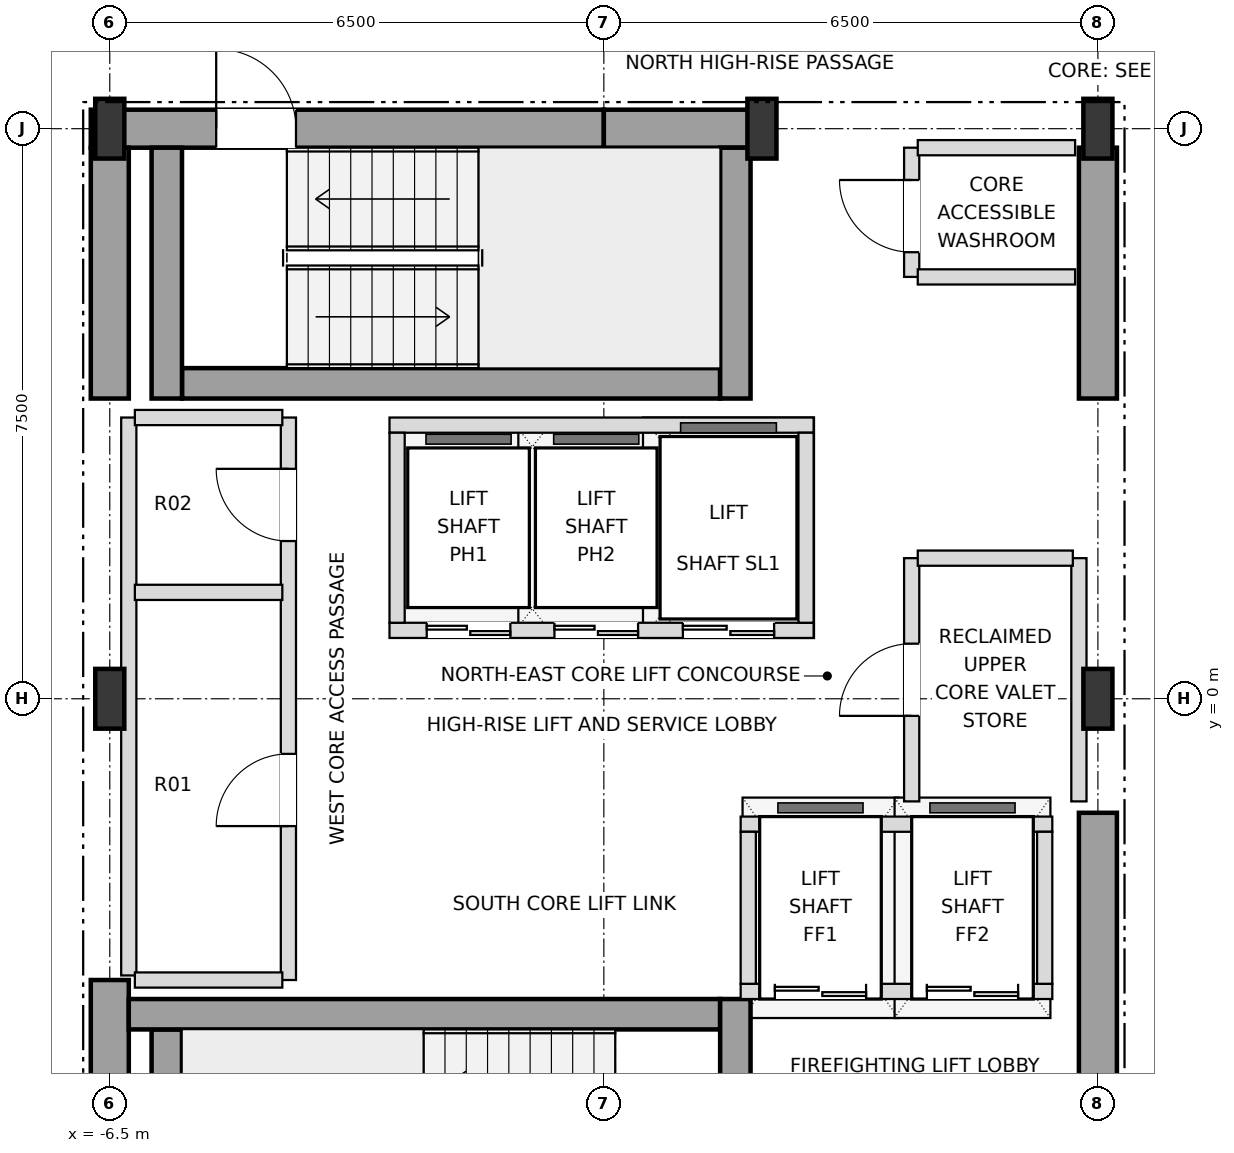
"""IFC4 building model, lengths in metres.
Left out: names, types, materials, properties, quantities, classifications, styles, units other than length and angle.
Written with IfcOpenShell. Run it as: python <this file> out.ifc"""

import sys

from ifc_helpers import new_model, si_unit, direction, frame, frame_2d, origin, origin_2d, place, context, subcontext, project, spatial, rectangle, i_section, extrude, element, fill, save


model = new_model("IFC4")
c1 = context("Model", 3, precision=1e-05, world=origin(), true_north=direction((0.0, 1.0)))
c2 = subcontext(c1, "Body", "Model", "MODEL_VIEW")
j1 = project(units=[si_unit("LENGTHUNIT", "METRE"), si_unit("PLANEANGLEUNIT", "RADIAN")], contexts=[c1])
p1 = place(None, origin())
s1 = spatial("IfcSite", under=j1, at=p1, CompositionType="ELEMENT")
p2 = place(p1, origin())
s2 = spatial("IfcBuilding", under=s1, at=p2, CompositionType="ELEMENT")
p3 = place(p2, frame((0.0, 0.0, 240.3)))
s3 = spatial("IfcBuildingStorey", under=s2, at=p3, CompositionType="ELEMENT", Elevation=240.3)
for number, where, z_axis, x_axis in (
    (1, (-6.5, 0.0, 0.0), (0.0, 0.0, 1.0), (1.0, 0.0, 0.0)),
    (2, (6.5, 0.0, 0.0), (0.0, 0.0, 1.0), (1.0, 0.0, 0.0)),
    (3, (-6.5, 7.5, 0.0), (0.0, 0.0, 1.0), (1.0, 0.0, 0.0)),
    (4, (2.08, 7.5, 0.0), (0.0, 0.0, 1.0), (1.0, 0.0, 0.0)),
    (5, (6.5, 7.5, 0.0), (0.0, 0.0, 1.0), (1.0, 0.0, 0.0)),
):
    element("IfcColumn", number, at=place(p3, frame(where, z_axis=z_axis, x_axis=x_axis)), inside=s3, PredefinedType="COLUMN", context=c2, shape_type="SweptSolid", body=[
        extrude(i_section(OverallWidth=0.382, OverallDepth=0.786, WebThickness=0.02, FlangeThickness=0.033, at=origin_2d()), origin(), (0.0, 0.0, 1.0), 3.6),
    ])
p4 = place(p3, frame((-6.75, 7.5, 0.0), z_axis=(0.0, 0.0, 1.0), x_axis=(1.0, 0.0, 0.0)))
e6 = element("IfcWall", 6, at=p4, inside=s3, PredefinedType="SHEAR", context=c2, shape_type="SweptSolid", body=[
    extrude(rectangle(XDim=6.75, YDim=0.5, at=frame_2d((3.375, 0.0))), origin(), (0.0, 0.0, 1.0), 3.38),
])
p5 = place(p4, frame((1.65, 0.0, 0.0)))
e7 = element("IfcOpeningElement", 7, at=p5, cuts=e6, PredefinedType="OPENING", context=c2, shape_type="SweptSolid", body=[
    extrude(rectangle(XDim=1.05, YDim=2.15, at=frame_2d((0.525, 1.075))), frame((0.0, 0.26, 0.0), z_axis=(0.0, -1.0, 0.0), x_axis=(1.0, 0.0, 0.0)), (0.0, 0.0, 1.0), 0.52),
])
p6 = place(p3, frame((0.0, 7.5, 0.0), z_axis=(0.0, 0.0, 1.0), x_axis=(1.0, 0.0, 0.0)))
e8 = element("IfcWall", 8, at=p6, inside=s3, PredefinedType="SHEAR", context=c2, shape_type="SweptSolid", body=[
    extrude(rectangle(XDim=2.08, YDim=0.5, at=frame_2d((1.04, 0.0))), origin(), (0.0, 0.0, 1.0), 3.38),
])
p7 = place(p3, frame((-6.5, -7.25, 0.0), z_axis=(0.0, 0.0, 1.0), x_axis=(0.0, 1.0, 0.0)))
e9 = element("IfcWall", 9, at=p7, inside=s3, PredefinedType="SHEAR", context=c2, shape_type="SweptSolid", body=[
    extrude(rectangle(XDim=3.55, YDim=0.5, at=frame_2d((1.775, 0.0))), origin(), (0.0, 0.0, 1.0), 3.38),
])
p8 = place(p3, frame((-6.5, 3.95, 0.0), z_axis=(0.0, 0.0, 1.0), x_axis=(0.0, 1.0, 0.0)))
e10 = element("IfcWall", 10, at=p8, inside=s3, PredefinedType="SHEAR", context=c2, shape_type="SweptSolid", body=[
    extrude(rectangle(XDim=3.3, YDim=0.5, at=frame_2d((1.65, 0.0))), origin(), (0.0, 0.0, 1.0), 3.38),
])
p9 = place(p3, frame((6.5, -7.25, 0.0), z_axis=(0.0, 0.0, 1.0), x_axis=(0.0, 1.0, 0.0)))
e11 = element("IfcWall", 11, at=p9, inside=s3, PredefinedType="SHEAR", context=c2, shape_type="SweptSolid", body=[
    extrude(rectangle(XDim=5.75, YDim=0.5, at=frame_2d((2.875, 0.0))), origin(), (0.0, 0.0, 1.0), 3.38),
])
p10 = place(p9, frame((0.85, 0.0, 0.0)))
e12 = element("IfcOpeningElement", 12, at=p10, cuts=e11, PredefinedType="OPENING", context=c2, shape_type="SweptSolid", body=[
    extrude(rectangle(XDim=1.05, YDim=2.15, at=frame_2d((0.525, 1.075))), frame((0.0, 0.26, 0.0), z_axis=(0.0, -1.0, 0.0), x_axis=(1.0, 0.0, 0.0)), (0.0, 0.0, 1.0), 0.52),
])
p11 = place(p3, frame((6.5, 3.95, 0.0), z_axis=(0.0, 0.0, 1.0), x_axis=(0.0, 1.0, 0.0)))
e13 = element("IfcWall", 13, at=p11, inside=s3, PredefinedType="SHEAR", context=c2, shape_type="SweptSolid", body=[
    extrude(rectangle(XDim=3.3, YDim=0.5, at=frame_2d((1.65, 0.0))), origin(), (0.0, 0.0, 1.0), 3.38),
])
p12 = place(p3, frame((-5.75, -7.25, 0.0), z_axis=(0.0, 0.0, 1.0), x_axis=(0.0, 1.0, 0.0)))
e14 = element("IfcWall", 14, at=p12, inside=s3, PredefinedType="SHEAR", context=c2, shape_type="SweptSolid", body=[
    extrude(rectangle(XDim=2.9, YDim=0.4, at=frame_2d((1.45, 0.0))), origin(), (0.0, 0.0, 1.0), 3.38),
])
p13 = place(p3, frame((-6.25, -4.15, 0.0), z_axis=(0.0, 0.0, 1.0), x_axis=(1.0, 0.0, 0.0)))
e15 = element("IfcWall", 15, at=p13, inside=s3, PredefinedType="SHEAR", context=c2, shape_type="SweptSolid", body=[
    extrude(rectangle(XDim=7.78, YDim=0.4, at=frame_2d((3.89, 0.0))), origin(), (0.0, 0.0, 1.0), 3.38),
])
p14 = place(p3, frame((1.73, -7.25, 0.0), z_axis=(0.0, 0.0, 1.0), x_axis=(0.0, 1.0, 0.0)))
e16 = element("IfcWall", 16, at=p14, inside=s3, PredefinedType="SHEAR", context=c2, shape_type="SweptSolid", body=[
    extrude(rectangle(XDim=3.3, YDim=0.4, at=frame_2d((1.65, 0.0))), origin(), (0.0, 0.0, 1.0), 3.38),
])
p15 = place(p14, frame((0.9, 0.0, 0.0)))
e17 = element("IfcOpeningElement", 17, at=p15, cuts=e16, PredefinedType="OPENING", context=c2, shape_type="SweptSolid", body=[
    extrude(rectangle(XDim=1.05, YDim=2.15, at=frame_2d((0.525, 1.075))), frame((0.0, 0.21, 0.0), z_axis=(0.0, -1.0, 0.0), x_axis=(1.0, 0.0, 0.0)), (0.0, 0.0, 1.0), 0.42),
])
p16 = place(p3, frame((-5.55, 4.15, 0.0), z_axis=(0.0, 0.0, 1.0), x_axis=(1.0, 0.0, 0.0)))
e18 = element("IfcWall", 18, at=p16, inside=s3, PredefinedType="SHEAR", context=c2, shape_type="SweptSolid", body=[
    extrude(rectangle(XDim=7.08, YDim=0.4, at=frame_2d((3.54, 0.0))), origin(), (0.0, 0.0, 1.0), 3.38),
])
for number, where, z_axis, x_axis in (
    (19, (1.73, 3.95, 0.0), (0.0, 0.0, 1.0), (0.0, 1.0, 0.0)),
    (20, (-5.75, 3.95, 0.0), (0.0, 0.0, 1.0), (0.0, 1.0, 0.0)),
):
    element("IfcWall", number, at=place(p3, frame(where, z_axis=z_axis, x_axis=x_axis)), inside=s3, PredefinedType="SHEAR", context=c2, shape_type="SweptSolid", body=[
        extrude(rectangle(XDim=3.3, YDim=0.4, at=frame_2d((1.65, 0.0))), origin(), (0.0, 0.0, 1.0), 3.38),
    ])
p17 = place(p3, frame((-2.82, 0.9, 0.0), z_axis=(0.0, 0.0, 1.0), x_axis=(1.0, 0.0, 0.0)))
e21 = element("IfcWall", 21, at=p17, inside=s3, PredefinedType="SOLIDWALL", context=c2, shape_type="SweptSolid", body=[
    extrude(rectangle(XDim=5.58, YDim=0.2, at=frame_2d((2.79, 0.0))), origin(), (0.0, 0.0, 1.0), 3.38),
])
p18 = place(p17, frame((0.49, 0.0, 0.0)))
e22 = element("IfcOpeningElement", 22, at=p18, cuts=e21, PredefinedType="OPENING", context=c2, shape_type="SweptSolid", body=[
    extrude(rectangle(XDim=1.1, YDim=2.15, at=frame_2d((0.55, 1.075))), frame((0.0, 0.11, 0.0), z_axis=(0.0, -1.0, 0.0), x_axis=(1.0, 0.0, 0.0)), (0.0, 0.0, 1.0), 0.22),
])
p19 = place(p17, frame((2.17, 0.0, 0.0)))
e23 = element("IfcOpeningElement", 23, at=p19, cuts=e21, PredefinedType="OPENING", context=c2, shape_type="SweptSolid", body=[
    extrude(rectangle(XDim=1.1, YDim=2.15, at=frame_2d((0.55, 1.075))), frame((0.0, 0.11, 0.0), z_axis=(0.0, -1.0, 0.0), x_axis=(1.0, 0.0, 0.0)), (0.0, 0.0, 1.0), 0.22),
])
p20 = place(p17, frame((3.86, 0.0, 0.0)))
e24 = element("IfcOpeningElement", 24, at=p20, cuts=e21, PredefinedType="OPENING", context=c2, shape_type="SweptSolid", body=[
    extrude(rectangle(XDim=1.2, YDim=2.2, at=frame_2d((0.6, 1.1))), frame((0.0, 0.11, 0.0), z_axis=(0.0, -1.0, 0.0), x_axis=(1.0, 0.0, 0.0)), (0.0, 0.0, 1.0), 0.22),
])
p21 = place(p3, frame((-2.82, 3.6, 0.0), z_axis=(0.0, 0.0, 1.0), x_axis=(1.0, 0.0, 0.0)))
e25 = element("IfcWall", 25, at=p21, inside=s3, PredefinedType="SOLIDWALL", context=c2, shape_type="SweptSolid", body=[
    extrude(rectangle(XDim=5.58, YDim=0.2, at=frame_2d((2.79, 0.0))), origin(), (0.0, 0.0, 1.0), 3.38),
])
for number, where, z_axis, x_axis in (
    (26, (-2.72, 1.0, 0.0), (0.0, 0.0, 1.0), (0.0, 1.0, 0.0)),
    (27, (2.66, 1.0, 0.0), (0.0, 0.0, 1.0), (0.0, 1.0, 0.0)),
):
    element("IfcWall", number, at=place(p3, frame(where, z_axis=z_axis, x_axis=x_axis)), inside=s3, PredefinedType="SOLIDWALL", context=c2, shape_type="SweptSolid", body=[
        extrude(rectangle(XDim=2.5, YDim=0.2, at=frame_2d((1.25, 0.0))), origin(), (0.0, 0.0, 1.0), 3.38),
    ])
p22 = place(p3, frame((1.8, -3.85, 0.0), z_axis=(0.0, 0.0, 1.0), x_axis=(1.0, 0.0, 0.0)))
e28 = element("IfcWall", 28, at=p22, inside=s3, PredefinedType="SOLIDWALL", context=c2, shape_type="SweptSolid", body=[
    extrude(rectangle(XDim=4.1, YDim=0.2, at=frame_2d((2.05, 0.0))), origin(), (0.0, 0.0, 1.0), 3.38),
])
p23 = place(p22, frame((0.45, 0.0, 0.0)))
e29 = element("IfcOpeningElement", 29, at=p23, cuts=e28, PredefinedType="OPENING", context=c2, shape_type="SweptSolid", body=[
    extrude(rectangle(XDim=1.2, YDim=2.2, at=frame_2d((0.6, 1.1))), frame((0.0, 0.11, 0.0), z_axis=(0.0, -1.0, 0.0), x_axis=(1.0, 0.0, 0.0)), (0.0, 0.0, 1.0), 0.22),
])
p24 = place(p22, frame((2.45, 0.0, 0.0)))
e30 = element("IfcOpeningElement", 30, at=p24, cuts=e28, PredefinedType="OPENING", context=c2, shape_type="SweptSolid", body=[
    extrude(rectangle(XDim=1.2, YDim=2.2, at=frame_2d((0.6, 1.1))), frame((0.0, 0.11, 0.0), z_axis=(0.0, -1.0, 0.0), x_axis=(1.0, 0.0, 0.0)), (0.0, 0.0, 1.0), 0.22),
])
p25 = place(p3, frame((1.8, -1.65, 0.0), z_axis=(0.0, 0.0, 1.0), x_axis=(1.0, 0.0, 0.0)))
e31 = element("IfcWall", 31, at=p25, inside=s3, PredefinedType="SOLIDWALL", context=c2, shape_type="SweptSolid", body=[
    extrude(rectangle(XDim=4.1, YDim=0.2, at=frame_2d((2.05, 0.0))), origin(), (0.0, 0.0, 1.0), 3.38),
])
for number, where, z_axis, x_axis in (
    (32, (1.9, -3.75, 0.0), (0.0, 0.0, 1.0), (0.0, 1.0, 0.0)),
    (33, (5.8, -3.75, 0.0), (0.0, 0.0, 1.0), (0.0, 1.0, 0.0)),
):
    element("IfcWall", number, at=place(p3, frame(where, z_axis=z_axis, x_axis=x_axis)), inside=s3, PredefinedType="SOLIDWALL", context=c2, shape_type="SweptSolid", body=[
        extrude(rectangle(XDim=2.0, YDim=0.2, at=frame_2d((1.0, 0.0))), origin(), (0.0, 0.0, 1.0), 3.38),
    ])
p26 = place(p3, frame((-6.25, -3.64, 0.0), z_axis=(0.0, 0.0, 1.0), x_axis=(0.0, 1.0, 0.0)))
e34 = element("IfcWall", 34, at=p26, inside=s3, PredefinedType="SOLIDWALL", context=c2, shape_type="SweptSolid", body=[
    extrude(rectangle(XDim=7.34, YDim=0.2, at=frame_2d((3.67, 0.0))), origin(), (0.0, 0.0, 1.0), 3.38),
])
p27 = place(p3, frame((-4.15, -3.7, 0.0), z_axis=(0.0, 0.0, 1.0), x_axis=(0.0, 1.0, 0.0)))
e35 = element("IfcWall", 35, at=p27, inside=s3, PredefinedType="SOLIDWALL", context=c2, shape_type="SweptSolid", body=[
    extrude(rectangle(XDim=7.4, YDim=0.2, at=frame_2d((3.7, 0.0))), origin(), (0.0, 0.0, 1.0), 3.38),
])
p28 = place(p27, frame((2.025, 0.0, 0.0)))
e36 = element("IfcOpeningElement", 36, at=p28, cuts=e35, PredefinedType="OPENING", context=c2, shape_type="SweptSolid", body=[
    extrude(rectangle(XDim=0.95, YDim=2.15, at=frame_2d((0.475, 1.075))), frame((0.0, 0.11, 0.0), z_axis=(0.0, -1.0, 0.0), x_axis=(1.0, 0.0, 0.0)), (0.0, 0.0, 1.0), 0.22),
])
p29 = place(p27, frame((5.775, 0.0, 0.0)))
e37 = element("IfcOpeningElement", 37, at=p29, cuts=e35, PredefinedType="OPENING", context=c2, shape_type="SweptSolid", body=[
    extrude(rectangle(XDim=0.95, YDim=2.15, at=frame_2d((0.475, 1.075))), frame((0.0, 0.11, 0.0), z_axis=(0.0, -1.0, 0.0), x_axis=(1.0, 0.0, 0.0)), (0.0, 0.0, 1.0), 0.22),
])
p30 = place(p3, frame((4.05, -1.35, 0.0), z_axis=(0.0, 0.0, 1.0), x_axis=(0.0, 1.0, 0.0)))
e38 = element("IfcWall", 38, at=p30, inside=s3, PredefinedType="SOLIDWALL", context=c2, shape_type="SweptSolid", body=[
    extrude(rectangle(XDim=3.2, YDim=0.2, at=frame_2d((1.6, 0.0))), origin(), (0.0, 0.0, 1.0), 3.38),
])
p31 = place(p30, frame((1.125, 0.0, 0.0)))
e39 = element("IfcOpeningElement", 39, at=p31, cuts=e38, PredefinedType="OPENING", context=c2, shape_type="SweptSolid", body=[
    extrude(rectangle(XDim=0.95, YDim=2.15, at=frame_2d((0.475, 1.075))), frame((0.0, 0.11, 0.0), z_axis=(0.0, -1.0, 0.0), x_axis=(1.0, 0.0, 0.0)), (0.0, 0.0, 1.0), 0.22),
])
p32 = place(p3, frame((4.05, 5.55, 0.0), z_axis=(0.0, 0.0, 1.0), x_axis=(0.0, 1.0, 0.0)))
e40 = element("IfcWall", 40, at=p32, inside=s3, PredefinedType="SOLIDWALL", context=c2, shape_type="SweptSolid", body=[
    extrude(rectangle(XDim=1.7, YDim=0.2, at=frame_2d((0.85, 0.0))), origin(), (0.0, 0.0, 1.0), 3.38),
])
p33 = place(p32, frame((0.325, 0.0, 0.0)))
e41 = element("IfcOpeningElement", 41, at=p33, cuts=e40, PredefinedType="OPENING", context=c2, shape_type="SweptSolid", body=[
    extrude(rectangle(XDim=0.95, YDim=2.15, at=frame_2d((0.475, 1.075))), frame((0.0, 0.11, 0.0), z_axis=(0.0, -1.0, 0.0), x_axis=(1.0, 0.0, 0.0)), (0.0, 0.0, 1.0), 0.22),
])
p34 = place(p3, frame((6.25, -1.35, 0.0), z_axis=(0.0, 0.0, 1.0), x_axis=(0.0, 1.0, 0.0)))
e42 = element("IfcWall", 42, at=p34, inside=s3, PredefinedType="SOLIDWALL", context=c2, shape_type="SweptSolid", body=[
    extrude(rectangle(XDim=3.2, YDim=0.2, at=frame_2d((1.6, 0.0))), origin(), (0.0, 0.0, 1.0), 3.38),
])
for number, where, z_axis, x_axis in (
    (43, (-6.17, -3.7, 0.0), (0.0, 0.0, 1.0), (1.0, 0.0, 0.0)),
    (44, (-6.17, 1.4, 0.0), (0.0, 0.0, 1.0), (1.0, 0.0, 0.0)),
):
    element("IfcWall", number, at=place(p3, frame(where, z_axis=z_axis, x_axis=x_axis)), inside=s3, PredefinedType="SOLIDWALL", context=c2, shape_type="SweptSolid", body=[
        extrude(rectangle(XDim=1.94, YDim=0.2, at=frame_2d((0.97, 0.0))), origin(), (0.0, 0.0, 1.0), 3.38),
    ])
p35 = place(p3, frame((4.13, 1.85, 0.0), z_axis=(0.0, 0.0, 1.0), x_axis=(1.0, 0.0, 0.0)))
e45 = element("IfcWall", 45, at=p35, inside=s3, PredefinedType="SOLIDWALL", context=c2, shape_type="SweptSolid", body=[
    extrude(rectangle(XDim=2.04, YDim=0.2, at=frame_2d((1.02, 0.0))), origin(), (0.0, 0.0, 1.0), 3.38),
])
p36 = place(p3, frame((-6.17, 3.7, 0.0), z_axis=(0.0, 0.0, 1.0), x_axis=(1.0, 0.0, 0.0)))
e46 = element("IfcWall", 46, at=p36, inside=s3, PredefinedType="SOLIDWALL", context=c2, shape_type="SweptSolid", body=[
    extrude(rectangle(XDim=1.94, YDim=0.2, at=frame_2d((0.97, 0.0))), origin(), (0.0, 0.0, 1.0), 3.38),
])
for number, where, z_axis, x_axis in (
    (47, (4.13, 5.55, 0.0), (0.0, 0.0, 1.0), (1.0, 0.0, 0.0)),
    (48, (4.13, 7.25, 0.0), (0.0, 0.0, 1.0), (1.0, 0.0, 0.0)),
):
    element("IfcWall", number, at=place(p3, frame(where, z_axis=z_axis, x_axis=x_axis)), inside=s3, PredefinedType="SOLIDWALL", context=c2, shape_type="SweptSolid", body=[
        extrude(rectangle(XDim=2.07, YDim=0.2, at=frame_2d((1.035, 0.0))), origin(), (0.0, 0.0, 1.0), 3.38),
    ])
p37 = place(p5, origin())
e49 = element("IfcDoor", 49, at=p37, inside=s3, OperationType="SINGLE_SWING_LEFT", PredefinedType="DOOR", context=c2, shape_type="SweptSolid", body=[
    extrude(rectangle(XDim=1.05, YDim=2.15, at=frame_2d((0.525, 1.075))), frame((0.0, 0.025, 0.0), z_axis=(0.0, -1.0, 0.0), x_axis=(1.0, 0.0, 0.0)), (0.0, 0.0, 1.0), 0.05),
])
fill(e7, e49)
p38 = place(p18, origin())
e50 = element("IfcDoor", 50, at=p38, inside=s3, OperationType="DOUBLE_DOOR_SLIDING", PredefinedType="DOOR", context=c2, shape_type="SweptSolid", body=[
    extrude(rectangle(XDim=1.1, YDim=2.15, at=frame_2d((0.55, 1.075))), frame((0.0, 0.025, 0.0), z_axis=(0.0, -1.0, 0.0), x_axis=(1.0, 0.0, 0.0)), (0.0, 0.0, 1.0), 0.05),
])
fill(e22, e50)
p39 = place(p19, origin())
e51 = element("IfcDoor", 51, at=p39, inside=s3, OperationType="DOUBLE_DOOR_SLIDING", PredefinedType="DOOR", context=c2, shape_type="SweptSolid", body=[
    extrude(rectangle(XDim=1.1, YDim=2.15, at=frame_2d((0.55, 1.075))), frame((0.0, 0.025, 0.0), z_axis=(0.0, -1.0, 0.0), x_axis=(1.0, 0.0, 0.0)), (0.0, 0.0, 1.0), 0.05),
])
fill(e23, e51)
p40 = place(p20, origin())
e52 = element("IfcDoor", 52, at=p40, inside=s3, OperationType="DOUBLE_DOOR_SLIDING", PredefinedType="DOOR", context=c2, shape_type="SweptSolid", body=[
    extrude(rectangle(XDim=1.2, YDim=2.2, at=frame_2d((0.6, 1.1))), frame((0.0, 0.025, 0.0), z_axis=(0.0, -1.0, 0.0), x_axis=(1.0, 0.0, 0.0)), (0.0, 0.0, 1.0), 0.05),
])
fill(e24, e52)
p41 = place(p23, origin())
e53 = element("IfcDoor", 53, at=p41, inside=s3, OperationType="DOUBLE_DOOR_SLIDING", PredefinedType="DOOR", context=c2, shape_type="SweptSolid", body=[
    extrude(rectangle(XDim=1.2, YDim=2.2, at=frame_2d((0.6, 1.1))), frame((0.0, 0.025, 0.0), z_axis=(0.0, -1.0, 0.0), x_axis=(1.0, 0.0, 0.0)), (0.0, 0.0, 1.0), 0.05),
])
fill(e29, e53)
p42 = place(p24, origin())
e54 = element("IfcDoor", 54, at=p42, inside=s3, OperationType="DOUBLE_DOOR_SLIDING", PredefinedType="DOOR", context=c2, shape_type="SweptSolid", body=[
    extrude(rectangle(XDim=1.2, YDim=2.2, at=frame_2d((0.6, 1.1))), frame((0.0, 0.025, 0.0), z_axis=(0.0, -1.0, 0.0), x_axis=(1.0, 0.0, 0.0)), (0.0, 0.0, 1.0), 0.05),
])
fill(e30, e54)
p43 = place(p28, origin())
e55 = element("IfcDoor", 55, at=p43, inside=s3, OperationType="SINGLE_SWING_LEFT", PredefinedType="DOOR", context=c2, shape_type="SweptSolid", body=[
    extrude(rectangle(XDim=0.95, YDim=2.15, at=frame_2d((0.475, 1.075))), frame((0.0, 0.025, 0.0), z_axis=(0.0, -1.0, 0.0), x_axis=(1.0, 0.0, 0.0)), (0.0, 0.0, 1.0), 0.05),
])
fill(e36, e55)
p44 = place(p29, origin())
e56 = element("IfcDoor", 56, at=p44, inside=s3, OperationType="SINGLE_SWING_RIGHT", PredefinedType="DOOR", context=c2, shape_type="SweptSolid", body=[
    extrude(rectangle(XDim=0.95, YDim=2.15, at=frame_2d((0.475, 1.075))), frame((0.0, 0.025, 0.0), z_axis=(0.0, -1.0, 0.0), x_axis=(1.0, 0.0, 0.0)), (0.0, 0.0, 1.0), 0.05),
])
fill(e37, e56)
p45 = place(p31, origin())
e57 = element("IfcDoor", 57, at=p45, inside=s3, OperationType="SINGLE_SWING_LEFT", PredefinedType="DOOR", context=c2, shape_type="SweptSolid", body=[
    extrude(rectangle(XDim=0.95, YDim=2.15, at=frame_2d((0.475, 1.075))), frame((0.0, 0.025, 0.0), z_axis=(0.0, -1.0, 0.0), x_axis=(1.0, 0.0, 0.0)), (0.0, 0.0, 1.0), 0.05),
])
fill(e39, e57)
p46 = place(p33, origin())
e58 = element("IfcDoor", 58, at=p46, inside=s3, OperationType="SINGLE_SWING_RIGHT", PredefinedType="DOOR", context=c2, shape_type="SweptSolid", body=[
    extrude(rectangle(XDim=0.95, YDim=2.15, at=frame_2d((0.475, 1.075))), frame((0.0, 0.025, 0.0), z_axis=(0.0, -1.0, 0.0), x_axis=(1.0, 0.0, 0.0)), (0.0, 0.0, 1.0), 0.05),
])
fill(e41, e58)
save(model, sys.argv[1])
